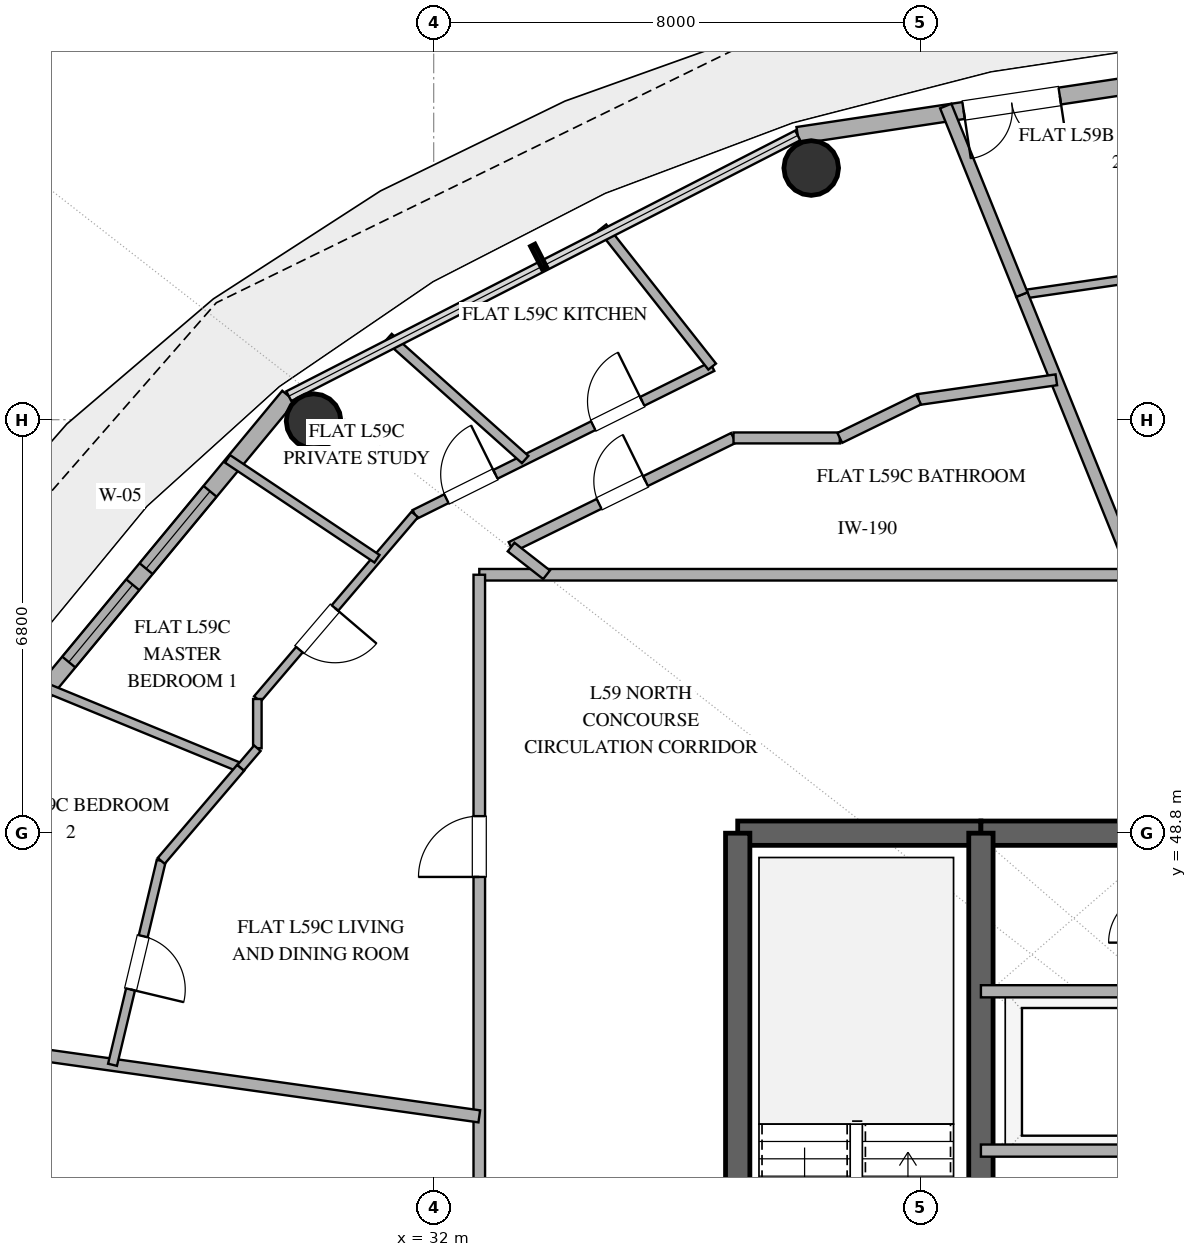
"""IFC4 building model, lengths in metres.
Left out: names, types, materials, properties, quantities, classifications, styles, units other than length and angle.
Written with IfcOpenShell. Run it as: python <this file> out.ifc"""

import sys

from ifc_helpers import new_model, si_unit, direction, frame, frame_2d, origin, origin_2d, place, context, subcontext, project, spatial, rectangle, hollow_circle, extrude, element, fill, save


model = new_model("IFC4")
c1 = context("Model", 3, precision=1e-05, world=origin(), true_north=direction((0.0, 1.0)))
c2 = subcontext(c1, "Body", "Model", "MODEL_VIEW")
j1 = project(units=[si_unit("LENGTHUNIT", "METRE"), si_unit("PLANEANGLEUNIT", "RADIAN")], contexts=[c1])
p1 = place(None, origin())
s1 = spatial("IfcSite", under=j1, at=p1, CompositionType="ELEMENT")
p2 = place(p1, origin())
s2 = spatial("IfcBuilding", under=s1, at=p2, CompositionType="ELEMENT")
p3 = place(p2, frame((0.0, 0.0, 231.6)))
s3 = spatial("IfcBuildingStorey", under=s2, at=p3, CompositionType="ELEMENT", Elevation=231.6)
p4 = place(p3, frame((37.0, 48.8, 0.0), z_axis=(0.0, 0.0, 1.0), x_axis=(1.0, 0.0, 0.0)))
e1 = element("IfcWall", 1, at=p4, inside=s3, PredefinedType="SHEAR", context=c2, shape_type="SweptSolid", body=[
    extrude(rectangle(XDim=4.0, YDim=0.4, at=frame_2d((2.0, 0.0))), origin(), (0.0, 0.0, 1.0), 3.36),
])
p5 = place(p3, frame((41.0, 48.8, 0.0), z_axis=(0.0, 0.0, 1.0), x_axis=(1.0, 0.0, 0.0)))
e2 = element("IfcWall", 2, at=p5, inside=s3, PredefinedType="SHEAR", context=c2, shape_type="SweptSolid", body=[
    extrude(rectangle(XDim=14.0, YDim=0.4, at=frame_2d((7.0, 0.0))), origin(), (0.0, 0.0, 1.0), 3.36),
])
p6 = place(p5, frame((6.1, 0.0, 0.0)))
e3 = element("IfcOpeningElement", 3, at=p6, cuts=e2, PredefinedType="OPENING", context=c2, shape_type="SweptSolid", body=[
    extrude(rectangle(XDim=1.8, YDim=2.25, at=frame_2d((0.9, 1.125))), frame((0.0, 0.21, 0.0), z_axis=(0.0, -1.0, 0.0), x_axis=(1.0, 0.0, 0.0)), (0.0, 0.0, 1.0), 0.42),
])
p7 = place(p3, frame((37.0, 35.2, 0.0), z_axis=(0.0, 0.0, 1.0), x_axis=(0.0, 1.0, 0.0)))
e4 = element("IfcWall", 4, at=p7, inside=s3, PredefinedType="SHEAR", context=c2, shape_type="SweptSolid", body=[
    extrude(rectangle(XDim=13.6, YDim=0.4, at=frame_2d((6.8, 0.0))), origin(), (0.0, 0.0, 1.0), 3.36),
])
p8 = place(p3, frame((41.0, 35.2, 0.0), z_axis=(0.0, 0.0, 1.0), x_axis=(0.0, 1.0, 0.0)))
e5 = element("IfcWall", 5, at=p8, inside=s3, PredefinedType="SHEAR", context=c2, shape_type="SweptSolid", body=[
    extrude(rectangle(XDim=13.6, YDim=0.4, at=frame_2d((6.8, 0.0))), origin(), (0.0, 0.0, 1.0), 3.36),
])
p9 = place(p8, frame((1.15, 0.0, 0.0)))
e6 = element("IfcOpeningElement", 6, at=p9, cuts=e5, PredefinedType="OPENING", context=c2, shape_type="SweptSolid", body=[
    extrude(rectangle(XDim=1.1, YDim=2.2, at=frame_2d((0.55, 1.1))), frame((0.0, 0.21, 0.0), z_axis=(0.0, -1.0, 0.0), x_axis=(1.0, 0.0, 0.0)), (0.0, 0.0, 1.0), 0.42),
])
for number, where, z_axis, x_axis in (
    (7, (38.209, 59.739, 0.0), (0.0, 0.0, 1.0), (1.0, 0.0, 0.0)),
    (8, (30.025, 55.576, 0.0), (0.0, 0.0, 1.0), (1.0, 0.0, 0.0)),
):
    element("IfcColumn", number, at=place(p3, frame(where, z_axis=z_axis, x_axis=x_axis)), inside=s3, PredefinedType="COLUMN", context=c2, shape_type="SweptSolid", body=[
        extrude(hollow_circle(Radius=0.45, WallThickness=0.025, at=origin_2d()), origin(), (0.0, 0.0, 1.0), 3.36),
    ])
p10 = place(p3, frame((48.0, 61.78, 0.0), z_axis=(0.0, 0.0, 1.0), x_axis=(-0.988882522213, -0.148698881169, 0.0)))
e9 = element("IfcWall", 9, at=p10, inside=s3, PredefinedType="SOLIDWALL", context=c2, shape_type="SweptSolid", body=[
    extrude(rectangle(XDim=10.125, YDim=0.28, at=frame_2d((5.062, 0.0))), origin(), (0.0, 0.0, 1.0), 3.36),
])
p11 = place(p10, frame((5.767, 0.0, 0.0)))
e10 = element("IfcOpeningElement", 10, at=p11, cuts=e9, PredefinedType="OPENING", context=c2, shape_type="SweptSolid", body=[
    extrude(rectangle(XDim=1.6, YDim=2.25, at=frame_2d((0.8, 1.125))), frame((0.0, 0.15, 0.0), z_axis=(0.0, -1.0, 0.0), x_axis=(1.0, 0.0, 0.0)), (0.0, 0.0, 1.0), 0.3),
])
p12 = place(p10, frame((0.866, 0.0, 0.85)))
e11 = element("IfcOpeningElement", 11, at=p12, cuts=e9, PredefinedType="OPENING", context=c2, shape_type="SweptSolid", body=[
    extrude(rectangle(XDim=1.0, YDim=1.8, at=frame_2d((0.5, 0.9))), frame((0.0, 0.15, 0.0), z_axis=(0.0, -1.0, 0.0), x_axis=(1.0, 0.0, 0.0)), (0.0, 0.0, 1.0), 0.3),
])
p13 = place(p3, frame((29.617, 55.987, 0.0), z_axis=(0.0, 0.0, 1.0), x_axis=(-0.63761509934, -0.770355103243, 0.0)))
e12 = element("IfcWall", 12, at=p13, inside=s3, PredefinedType="SOLIDWALL", context=c2, shape_type="SweptSolid", body=[
    extrude(rectangle(XDim=8.33, YDim=0.28, at=frame_2d((4.165, 0.0))), origin(), (0.0, 0.0, 1.0), 3.36),
])
p14 = place(p13, frame((2.031, 0.0, 0.85)))
e13 = element("IfcOpeningElement", 13, at=p14, cuts=e12, PredefinedType="OPENING", context=c2, shape_type="SweptSolid", body=[
    extrude(rectangle(XDim=1.65, YDim=2.0, at=frame_2d((0.825, 1.0))), frame((0.0, 0.15, 0.0), z_axis=(0.0, -1.0, 0.0), x_axis=(1.0, 0.0, 0.0)), (0.0, 0.0, 1.0), 0.3),
])
p15 = place(p13, frame((4.025, 0.0, 0.85)))
e14 = element("IfcOpeningElement", 14, at=p15, cuts=e12, PredefinedType="OPENING", context=c2, shape_type="SweptSolid", body=[
    extrude(rectangle(XDim=1.65, YDim=2.0, at=frame_2d((0.825, 1.0))), frame((0.0, 0.15, 0.0), z_axis=(0.0, -1.0, 0.0), x_axis=(1.0, 0.0, 0.0)), (0.0, 0.0, 1.0), 0.3),
])
p16 = place(p13, frame((6.536, 0.0, 0.85)))
e15 = element("IfcOpeningElement", 15, at=p16, cuts=e12, PredefinedType="OPENING", context=c2, shape_type="SweptSolid", body=[
    extrude(rectangle(XDim=0.85, YDim=1.8, at=frame_2d((0.425, 0.9))), frame((0.0, 0.15, 0.0), z_axis=(0.0, -1.0, 0.0), x_axis=(1.0, 0.0, 0.0)), (0.0, 0.0, 1.0), 0.3),
])
for number, where, z_axis, x_axis in (
    (16, (41.0, 46.2, 0.0), (0.0, 0.0, 1.0), (1.0, 0.0, 0.0)),
    (17, (41.0, 43.58, 0.0), (0.0, 0.0, 1.0), (1.0, 0.0, 0.0)),
):
    element("IfcWall", number, at=place(p3, frame(where, z_axis=z_axis, x_axis=x_axis)), inside=s3, PredefinedType="SOLIDWALL", context=c2, shape_type="SweptSolid", body=[
        extrude(rectangle(XDim=2.95, YDim=0.2, at=frame_2d((1.475, 0.0))), origin(), (0.0, 0.0, 1.0), 2.72),
    ])
p17 = place(p3, frame((23.868, 45.392, 0.0), z_axis=(0.0, 0.0, 1.0), x_axis=(0.281018983641, -0.959702209455, 0.0)))
e18 = element("IfcWall", 18, at=p17, inside=s3, PredefinedType="PLUMBINGWALL", context=c2, shape_type="SweptSolid", body=[
    extrude(rectangle(XDim=10.036, YDim=0.16, at=frame_2d((5.018, 0.0))), origin(), (0.0, 0.0, 1.0), 2.72),
])
p18 = place(p17, frame((4.568, 0.0, 0.0)))
e19 = element("IfcOpeningElement", 19, at=p18, cuts=e18, PredefinedType="OPENING", context=c2, shape_type="SweptSolid", body=[
    extrude(rectangle(XDim=0.9, YDim=2.1, at=frame_2d((0.45, 1.05))), frame((0.0, 0.09, 0.0), z_axis=(0.0, -1.0, 0.0), x_axis=(1.0, 0.0, 0.0)), (0.0, 0.0, 1.0), 0.18),
])
p19 = place(p3, frame((32.75, 53.05, 0.0), z_axis=(0.0, 0.0, 1.0), x_axis=(1.0, 0.0, 0.0)))
e20 = element("IfcWall", 20, at=p19, inside=s3, PredefinedType="PARTITIONING", context=c2, shape_type="SweptSolid", body=[
    extrude(rectangle(XDim=12.766, YDim=0.19, at=frame_2d((6.383, 0.0))), origin(), (0.0, 0.0, 1.0), 2.72),
])
p20 = place(p3, frame((32.75, 42.243, 0.0), z_axis=(0.0, 0.0, 1.0), x_axis=(0.0, 1.0, 0.0)))
e21 = element("IfcWall", 21, at=p20, inside=s3, PredefinedType="PARTITIONING", context=c2, shape_type="SweptSolid", body=[
    extrude(rectangle(XDim=10.807, YDim=0.19, at=frame_2d((5.404, 0.0))), origin(), (0.0, 0.0, 1.0), 2.72),
])
p21 = place(p20, frame((5.837, 0.0, 0.0)))
e22 = element("IfcOpeningElement", 22, at=p21, cuts=e21, PredefinedType="OPENING", context=c2, shape_type="SweptSolid", body=[
    extrude(rectangle(XDim=1.0, YDim=2.2, at=frame_2d((0.5, 1.1))), frame((0.0, 0.105, 0.0), z_axis=(0.0, -1.0, 0.0), x_axis=(1.0, 0.0, 0.0)), (0.0, 0.0, 1.0), 0.21),
])
p22 = place(p3, frame((23.237, 45.48, 0.0), z_axis=(0.0, 0.0, 1.0), x_axis=(0.990269661234, -0.139161769316, 0.0)))
e23 = element("IfcWall", 23, at=p22, inside=s3, PredefinedType="PARTITIONING", context=c2, shape_type="SweptSolid", body=[
    extrude(rectangle(XDim=9.607, YDim=0.2, at=frame_2d((4.803, 0.0))), origin(), (0.0, 0.0, 1.0), 2.72),
])
p23 = place(p3, frame((41.674, 57.657, 0.0), z_axis=(0.0, 0.0, 1.0), x_axis=(0.989537524877, 0.144275732054, 0.0)))
e24 = element("IfcWall", 24, at=p23, inside=s3, PredefinedType="PARTITIONING", context=c2, shape_type="SweptSolid", body=[
    extrude(rectangle(XDim=6.393, YDim=0.14, at=frame_2d((3.197, 0.0))), origin(), (0.0, 0.0, 1.0), 2.72),
])
p24 = place(p23, frame((1.609, 0.0, 0.0)))
e25 = element("IfcOpeningElement", 25, at=p24, cuts=e24, PredefinedType="OPENING", context=c2, shape_type="SweptSolid", body=[
    extrude(rectangle(XDim=0.9, YDim=2.1, at=frame_2d((0.45, 1.05))), frame((0.0, 0.08, 0.0), z_axis=(0.0, -1.0, 0.0), x_axis=(1.0, 0.0, 0.0)), (0.0, 0.0, 1.0), 0.16),
])
p25 = place(p23, frame((4.789, 0.0, 0.0)))
e26 = element("IfcOpeningElement", 26, at=p25, cuts=e24, PredefinedType="OPENING", context=c2, shape_type="SweptSolid", body=[
    extrude(rectangle(XDim=0.9, YDim=2.1, at=frame_2d((0.45, 1.05))), frame((0.0, 0.08, 0.0), z_axis=(0.0, -1.0, 0.0), x_axis=(1.0, 0.0, 0.0)), (0.0, 0.0, 1.0), 0.16),
])
p26 = place(p3, frame((33.273, 53.506, 0.0), z_axis=(0.0, 0.0, 1.0), x_axis=(0.89778136281, 0.440441397454, 0.0)))
e27 = element("IfcWall", 27, at=p26, inside=s3, PredefinedType="PLUMBINGWALL", context=c2, shape_type="SweptSolid", body=[
    extrude(rectangle(XDim=4.074, YDim=0.18, at=frame_2d((2.037, 0.0))), origin(), (0.0, 0.0, 1.0), 2.72),
])
p27 = place(p26, frame((1.612, 0.0, 0.0)))
e28 = element("IfcOpeningElement", 28, at=p27, cuts=e27, PredefinedType="OPENING", context=c2, shape_type="SweptSolid", body=[
    extrude(rectangle(XDim=0.85, YDim=2.1, at=frame_2d((0.425, 1.05))), frame((0.0, 0.1, 0.0), z_axis=(0.0, -1.0, 0.0), x_axis=(1.0, 0.0, 0.0)), (0.0, 0.0, 1.0), 0.2),
])
p28 = place(p3, frame((25.531, 51.229, 0.0), z_axis=(0.0, 0.0, 1.0), x_axis=(0.925009924445, -0.37994294266, 0.0)))
e29 = element("IfcWall", 29, at=p28, inside=s3, PredefinedType="PARTITIONING", context=c2, shape_type="SweptSolid", body=[
    extrude(rectangle(XDim=3.562, YDim=0.15, at=frame_2d((1.781, 0.0))), origin(), (0.0, 0.0, 1.0), 2.72),
])
p29 = place(p3, frame((31.689, 54.042, 0.0), z_axis=(0.0, 0.0, 1.0), x_axis=(0.895479575413, 0.445102606168, 0.0)))
e30 = element("IfcWall", 30, at=p29, inside=s3, PredefinedType="PLUMBINGWALL", context=c2, shape_type="SweptSolid", body=[
    extrude(rectangle(XDim=5.462, YDim=0.16, at=frame_2d((2.731, 0.0))), origin(), (0.0, 0.0, 1.0), 2.72),
])
p30 = place(p29, frame((3.278, 0.0, 0.0)))
e31 = element("IfcOpeningElement", 31, at=p30, cuts=e30, PredefinedType="OPENING", context=c2, shape_type="SweptSolid", body=[
    extrude(rectangle(XDim=0.9, YDim=2.1, at=frame_2d((0.45, 1.05))), frame((0.0, 0.09, 0.0), z_axis=(0.0, -1.0, 0.0), x_axis=(1.0, 0.0, 0.0)), (0.0, 0.0, 1.0), 0.18),
])
p31 = place(p29, frame((0.581, 0.0, 0.0)))
e32 = element("IfcOpeningElement", 32, at=p31, cuts=e30, PredefinedType="OPENING", context=c2, shape_type="SweptSolid", body=[
    extrude(rectangle(XDim=0.9, YDim=2.1, at=frame_2d((0.45, 1.05))), frame((0.0, 0.09, 0.0), z_axis=(0.0, -1.0, 0.0), x_axis=(1.0, 0.0, 0.0)), (0.0, 0.0, 1.0), 0.18),
])
p32 = place(p3, frame((41.674, 57.657, 0.0), z_axis=(0.0, 0.0, 1.0), x_axis=(0.374573524941, -0.927197214412, 0.0)))
e33 = element("IfcWall", 33, at=p32, inside=s3, PredefinedType="PARTITIONING", context=c2, shape_type="SweptSolid", body=[
    extrude(rectangle(XDim=4.969, YDim=0.2, at=frame_2d((2.485, 0.0))), origin(), (0.0, 0.0, 1.0), 2.72),
])
p33 = place(p3, frame((27.519, 48.345, 0.0), z_axis=(0.0, 0.0, 1.0), x_axis=(-0.232293676314, -0.97264569497, 0.0)))
e34 = element("IfcWall", 34, at=p33, inside=s3, PredefinedType="PARTITIONING", context=c2, shape_type="SweptSolid", body=[
    extrude(rectangle(XDim=3.448, YDim=0.15, at=frame_2d((1.724, 0.0))), origin(), (0.0, 0.0, 1.0), 2.72),
])
p34 = place(p33, frame((1.274, 0.0, 0.0)))
e35 = element("IfcOpeningElement", 35, at=p34, cuts=e34, PredefinedType="OPENING", context=c2, shape_type="SweptSolid", body=[
    extrude(rectangle(XDim=0.9, YDim=2.1, at=frame_2d((0.45, 1.05))), frame((0.0, 0.085, 0.0), z_axis=(0.0, -1.0, 0.0), x_axis=(1.0, 0.0, 0.0)), (0.0, 0.0, 1.0), 0.17),
])
p35 = place(p3, frame((41.674, 57.657, 0.0), z_axis=(0.0, 0.0, 1.0), x_axis=(-0.374572886439, 0.927197472357, 0.0)))
e36 = element("IfcWall", 36, at=p35, inside=s3, PredefinedType="PARTITIONING", context=c2, shape_type="SweptSolid", body=[
    extrude(rectangle(XDim=3.344, YDim=0.2, at=frame_2d((1.672, 0.0))), origin(), (0.0, 0.0, 1.0), 2.72),
])
p36 = place(p3, frame((31.689, 54.042, 0.0), z_axis=(0.0, 0.0, 1.0), x_axis=(-0.648985159088, -0.760801066826, 0.0)))
e37 = element("IfcWall", 37, at=p36, inside=s3, PredefinedType="PARTITIONING", context=c2, shape_type="SweptSolid", body=[
    extrude(rectangle(XDim=3.989, YDim=0.14, at=frame_2d((1.995, 0.0))), origin(), (0.0, 0.0, 1.0), 2.72),
])
p37 = place(p36, frame((2.023, 0.0, 0.0)))
e38 = element("IfcOpeningElement", 38, at=p37, cuts=e37, PredefinedType="OPENING", context=c2, shape_type="SweptSolid", body=[
    extrude(rectangle(XDim=0.9, YDim=2.1, at=frame_2d((0.45, 1.05))), frame((0.0, 0.08, 0.0), z_axis=(0.0, -1.0, 0.0), x_axis=(1.0, 0.0, 0.0)), (0.0, 0.0, 1.0), 0.16),
])
p38 = place(p3, frame((33.505, 54.945, 0.0), z_axis=(0.0, 0.0, 1.0), x_axis=(-0.745914664094, 0.66604152565, 0.0)))
e39 = element("IfcWall", 39, at=p38, inside=s3, PredefinedType="PLUMBINGWALL", context=c2, shape_type="SweptSolid", body=[
    extrude(rectangle(XDim=3.014, YDim=0.16, at=frame_2d((1.507, 0.0))), origin(), (0.0, 0.0, 1.0), 2.72),
])
p39 = place(p3, frame((28.609, 54.956, 0.0), z_axis=(0.0, 0.0, 1.0), x_axis=(0.831478101563, -0.555557527733, 0.0)))
e40 = element("IfcWall", 40, at=p39, inside=s3, PredefinedType="PARTITIONING", context=c2, shape_type="SweptSolid", body=[
    extrude(rectangle(XDim=2.956, YDim=0.15, at=frame_2d((1.478, 0.0))), origin(), (0.0, 0.0, 1.0), 2.72),
])
p40 = place(p3, frame((36.58, 56.473, 0.0), z_axis=(0.0, 0.0, 1.0), x_axis=(-0.619378047354, 0.785092882694, 0.0)))
e41 = element("IfcWall", 41, at=p40, inside=s3, PredefinedType="PLUMBINGWALL", context=c2, shape_type="SweptSolid", body=[
    extrude(rectangle(XDim=2.914, YDim=0.16, at=frame_2d((1.457, 0.0))), origin(), (0.0, 0.0, 1.0), 2.72),
])
p41 = place(p3, frame((39.976, 55.932, 0.0), z_axis=(0.0, 0.0, 1.0), x_axis=(0.989917445937, 0.141645509032, 0.0)))
e42 = element("IfcWall", 42, at=p41, inside=s3, PredefinedType="PLUMBINGWALL", context=c2, shape_type="SweptSolid", body=[
    extrude(rectangle(XDim=2.287, YDim=0.18, at=frame_2d((1.144, 0.0))), origin(), (0.0, 0.0, 1.0), 2.72),
])
p42 = place(p3, frame((28.826, 49.876, 0.0), z_axis=(0.0, 0.0, 1.0), x_axis=(-0.649252114502, -0.760573265251, 0.0)))
e43 = element("IfcWall", 43, at=p42, inside=s3, PredefinedType="PARTITIONING", context=c2, shape_type="SweptSolid", body=[
    extrude(rectangle(XDim=2.013, YDim=0.15, at=frame_2d((1.007, 0.0))), origin(), (0.0, 0.0, 1.0), 2.72),
])
p43 = place(p3, frame((36.931, 55.3, 0.0), z_axis=(0.0, 0.0, 1.0), x_axis=(1.0, 0.0, 0.0)))
e44 = element("IfcWall", 44, at=p43, inside=s3, PredefinedType="PLUMBINGWALL", context=c2, shape_type="SweptSolid", body=[
    extrude(rectangle(XDim=1.748, YDim=0.18, at=frame_2d((0.874, 0.0))), origin(), (0.0, 0.0, 1.0), 2.72),
])
p44 = place(p3, frame((38.679, 55.3, 0.0), z_axis=(0.0, 0.0, 1.0), x_axis=(0.898916394035, 0.438120207861, 0.0)))
e45 = element("IfcWall", 45, at=p44, inside=s3, PredefinedType="PLUMBINGWALL", context=c2, shape_type="SweptSolid", body=[
    extrude(rectangle(XDim=1.443, YDim=0.18, at=frame_2d((0.721, 0.0))), origin(), (0.0, 0.0, 1.0), 2.72),
])
p45 = place(p3, frame((29.1, 51.007, 0.0), z_axis=(0.0, 0.0, 1.0), x_axis=(0.0, -1.0, 0.0)))
e46 = element("IfcWall", 46, at=p45, inside=s3, PredefinedType="PARTITIONING", context=c2, shape_type="SweptSolid", body=[
    extrude(rectangle(XDim=0.81, YDim=0.14, at=frame_2d((0.405, 0.0))), origin(), (0.0, 0.0, 1.0), 2.72),
])
p46 = place(p3, frame((33.857, 53.05, 0.0), z_axis=(0.0, 0.0, 1.0), x_axis=(-0.788214334349, 0.615400815019, 0.0)))
e47 = element("IfcWall", 47, at=p46, inside=s3, PredefinedType="PLUMBINGWALL", context=c2, shape_type="SweptSolid", body=[
    extrude(rectangle(XDim=0.74, YDim=0.18, at=frame_2d((0.37, 0.0))), origin(), (0.0, 0.0, 1.0), 2.72),
])
p47 = place(p3, frame((29.1, 50.197, 0.0), z_axis=(0.0, 0.0, 1.0), x_axis=(-0.649360360175, -0.760480849617, 0.0)))
e48 = element("IfcWall", 48, at=p47, inside=s3, PredefinedType="PARTITIONING", context=c2, shape_type="SweptSolid", body=[
    extrude(rectangle(XDim=0.422, YDim=0.14, at=frame_2d((0.211, 0.0))), origin(), (0.0, 0.0, 1.0), 2.72),
])
p48 = place(p11, origin())
e49 = element("IfcDoor", 49, at=p48, inside=s3, OperationType="DOUBLE_DOOR_SINGLE_SWING", PredefinedType="DOOR", context=c2, shape_type="SweptSolid", body=[
    extrude(rectangle(XDim=1.6, YDim=2.25, at=frame_2d((0.8, 1.125))), frame((0.0, 0.025, 0.0), z_axis=(0.0, -1.0, 0.0), x_axis=(1.0, 0.0, 0.0)), (0.0, 0.0, 1.0), 0.05),
])
fill(e10, e49)
p49 = place(p14, origin())
e50 = element("IfcWindow", 50, at=p49, inside=s3, PartitioningType="SINGLE_PANEL", PredefinedType="WINDOW", context=c2, shape_type="SweptSolid", body=[
    extrude(rectangle(XDim=1.65, YDim=2.0, at=frame_2d((0.825, 1.0))), frame((0.0, 0.03, 0.0), z_axis=(0.0, -1.0, 0.0), x_axis=(1.0, 0.0, 0.0)), (0.0, 0.0, 1.0), 0.06),
])
fill(e13, e50)
p50 = place(p15, origin())
e51 = element("IfcWindow", 51, at=p50, inside=s3, PartitioningType="SINGLE_PANEL", PredefinedType="WINDOW", context=c2, shape_type="SweptSolid", body=[
    extrude(rectangle(XDim=1.65, YDim=2.0, at=frame_2d((0.825, 1.0))), frame((0.0, 0.03, 0.0), z_axis=(0.0, -1.0, 0.0), x_axis=(1.0, 0.0, 0.0)), (0.0, 0.0, 1.0), 0.06),
])
fill(e14, e51)
p51 = place(p21, origin())
e52 = element("IfcDoor", 52, at=p51, inside=s3, OperationType="SINGLE_SWING_LEFT", PredefinedType="DOOR", context=c2, shape_type="SweptSolid", body=[
    extrude(rectangle(XDim=1.0, YDim=2.2, at=frame_2d((0.5, 1.1))), frame((0.0, 0.025, 0.0), z_axis=(0.0, -1.0, 0.0), x_axis=(1.0, 0.0, 0.0)), (0.0, 0.0, 1.0), 0.05),
])
fill(e22, e52)
p52 = place(p27, origin())
e53 = element("IfcDoor", 53, at=p52, inside=s3, OperationType="SINGLE_SWING_RIGHT", PredefinedType="DOOR", context=c2, shape_type="SweptSolid", body=[
    extrude(rectangle(XDim=0.85, YDim=2.1, at=frame_2d((0.425, 1.05))), frame((0.0, 0.025, 0.0), z_axis=(0.0, -1.0, 0.0), x_axis=(1.0, 0.0, 0.0)), (0.0, 0.0, 1.0), 0.05),
])
fill(e28, e53)
p53 = place(p30, origin())
e54 = element("IfcDoor", 54, at=p53, inside=s3, OperationType="SINGLE_SWING_RIGHT", PredefinedType="DOOR", context=c2, shape_type="SweptSolid", body=[
    extrude(rectangle(XDim=0.9, YDim=2.1, at=frame_2d((0.45, 1.05))), frame((0.0, 0.025, 0.0), z_axis=(0.0, -1.0, 0.0), x_axis=(1.0, 0.0, 0.0)), (0.0, 0.0, 1.0), 0.05),
])
fill(e31, e54)
p54 = place(p31, origin())
e55 = element("IfcDoor", 55, at=p54, inside=s3, OperationType="SINGLE_SWING_RIGHT", PredefinedType="DOOR", context=c2, shape_type="SweptSolid", body=[
    extrude(rectangle(XDim=0.9, YDim=2.1, at=frame_2d((0.45, 1.05))), frame((0.0, 0.025, 0.0), z_axis=(0.0, -1.0, 0.0), x_axis=(1.0, 0.0, 0.0)), (0.0, 0.0, 1.0), 0.05),
])
fill(e32, e55)
p55 = place(p34, origin())
e56 = element("IfcDoor", 56, at=p55, inside=s3, OperationType="SINGLE_SWING_RIGHT", PredefinedType="DOOR", context=c2, shape_type="SweptSolid", body=[
    extrude(rectangle(XDim=0.9, YDim=2.1, at=frame_2d((0.45, 1.05))), frame((0.0, 0.025, 0.0), z_axis=(0.0, -1.0, 0.0), x_axis=(1.0, 0.0, 0.0)), (0.0, 0.0, 1.0), 0.05),
])
fill(e35, e56)
p56 = place(p37, origin())
e57 = element("IfcDoor", 57, at=p56, inside=s3, OperationType="SINGLE_SWING_LEFT", PredefinedType="DOOR", context=c2, shape_type="SweptSolid", body=[
    extrude(rectangle(XDim=0.9, YDim=2.1, at=frame_2d((0.45, 1.05))), frame((0.0, 0.025, 0.0), z_axis=(0.0, -1.0, 0.0), x_axis=(1.0, 0.0, 0.0)), (0.0, 0.0, 1.0), 0.05),
])
fill(e38, e57)
save(model, sys.argv[1])
